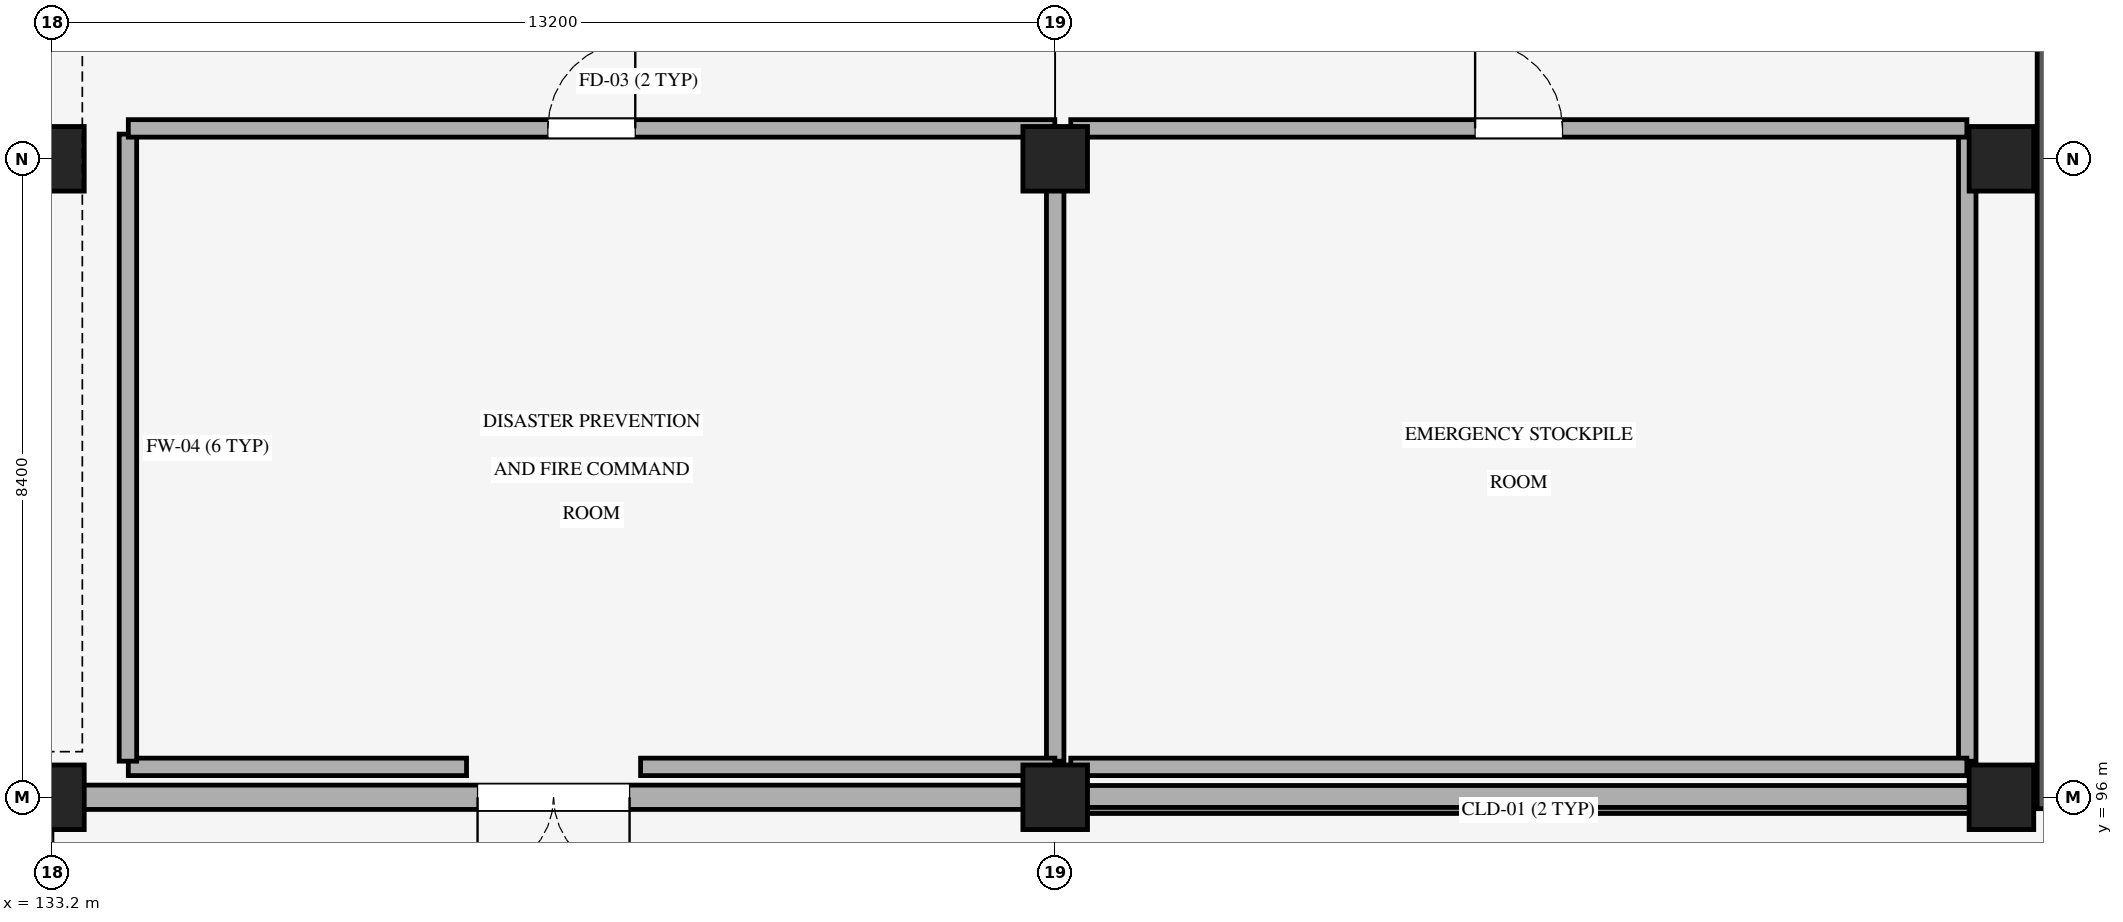
"""IFC4 building model, lengths in metres.
Left out: names, types, materials, properties, quantities, classifications, styles, units other than length and angle.
Written with IfcOpenShell. Run it as: python <this file> out.ifc"""

import sys

from ifc_helpers import new_model, si_unit, direction, frame, frame_2d, origin, origin_2d, place, context, subcontext, project, spatial, rectangle, extrude, element, fill, save


model = new_model("IFC4")
c1 = context("Model", 3, precision=1e-05, world=origin(), true_north=direction((0.0, 1.0)))
c2 = subcontext(c1, "Body", "Model", "MODEL_VIEW")
j1 = project(units=[si_unit("LENGTHUNIT", "METRE"), si_unit("PLANEANGLEUNIT", "RADIAN")], contexts=[c1])
p1 = place(None, origin())
s1 = spatial("IfcSite", under=j1, at=p1, CompositionType="ELEMENT")
p2 = place(p1, origin())
s2 = spatial("IfcBuilding", under=s1, at=p2, CompositionType="ELEMENT")
p3 = place(p2, origin())
s3 = spatial("IfcBuildingStorey", under=s2, at=p3, CompositionType="ELEMENT", Elevation=0.0)
for number, where, z_axis, x_axis in (
    (1, (133.2, 96.0, 0.0), (0.0, 0.0, 1.0), (1.0, 0.0, 0.0)),
    (2, (133.2, 104.4, 0.0), (0.0, 0.0, 1.0), (1.0, 0.0, 0.0)),
    (3, (146.4, 96.0, 0.0), (0.0, 0.0, 1.0), (1.0, 0.0, 0.0)),
    (4, (146.4, 104.4, 0.0), (0.0, 0.0, 1.0), (1.0, 0.0, 0.0)),
    (5, (158.85, 96.0, 0.0), (0.0, 0.0, 1.0), (1.0, 0.0, 0.0)),
    (6, (158.85, 104.4, 0.0), (0.0, 0.0, 1.0), (1.0, 0.0, 0.0)),
):
    element("IfcColumn", number, at=place(p3, frame(where, z_axis=z_axis, x_axis=x_axis)), inside=s3, PredefinedType="COLUMN", context=c2, shape_type="SweptSolid", body=[
        extrude(rectangle(XDim=0.85, YDim=0.85, at=origin_2d()), origin(), (0.0, 0.0, 1.0), 4.8),
    ])
p4 = place(p3, frame((158.85, 96.0, 0.0), z_axis=(0.0, 0.0, 1.0), x_axis=(-1.0, 0.0, 0.0)))
e7 = element("IfcWall", 7, at=p4, inside=s3, PredefinedType="STANDARD", context=c2, shape_type="SweptSolid", body=[
    extrude(rectangle(XDim=12.45, YDim=0.31, at=frame_2d((6.225, 0.0))), origin(), (0.0, 0.0, 1.0), 3.67),
])
p5 = place(p3, frame((146.4, 96.0, 0.0), z_axis=(0.0, 0.0, 1.0), x_axis=(-1.0, 0.0, 0.0)))
e8 = element("IfcWall", 8, at=p5, inside=s3, PredefinedType="STANDARD", context=c2, shape_type="SweptSolid", body=[
    extrude(rectangle(XDim=13.2, YDim=0.32, at=frame_2d((6.6, 0.0))), origin(), (0.0, 0.0, 1.0), 3.67),
])
p6 = place(p5, frame((5.6, 0.0, 0.0)))
e9 = element("IfcOpeningElement", 9, at=p6, cuts=e8, PredefinedType="OPENING", context=c2, shape_type="SweptSolid", body=[
    extrude(rectangle(XDim=2.0, YDim=2.4, at=frame_2d((1.0, 1.2))), frame((0.0, 0.17, 0.0), z_axis=(0.0, -1.0, 0.0), x_axis=(1.0, 0.0, 0.0)), (0.0, 0.0, 1.0), 0.34),
])
p7 = place(p3, frame((133.2, 96.0, 0.0), z_axis=(0.0, 0.0, 1.0), x_axis=(-1.0, 0.0, 0.0)))
e10 = element("IfcWall", 10, at=p7, inside=s3, PredefinedType="STANDARD", context=c2, shape_type="SweptSolid", body=[
    extrude(rectangle(XDim=9.6, YDim=0.32, at=frame_2d((4.8, 0.0))), origin(), (0.0, 0.0, 1.0), 3.67),
])
p8 = place(p7, frame((2.022, 0.0, 0.65)))
e11 = element("IfcOpeningElement", 11, at=p8, cuts=e10, PredefinedType="OPENING", context=c2, shape_type="SweptSolid", body=[
    extrude(rectangle(XDim=2.1, YDim=1.65, at=frame_2d((1.05, 0.825))), frame((0.0, 0.17, 0.0), z_axis=(0.0, -1.0, 0.0), x_axis=(1.0, 0.0, 0.0)), (0.0, 0.0, 1.0), 0.34),
])
p9 = place(p7, frame((5.478, 0.0, 0.65)))
e12 = element("IfcOpeningElement", 12, at=p9, cuts=e10, PredefinedType="OPENING", context=c2, shape_type="SweptSolid", body=[
    extrude(rectangle(XDim=2.1, YDim=1.65, at=frame_2d((1.05, 0.825))), frame((0.0, 0.17, 0.0), z_axis=(0.0, -1.0, 0.0), x_axis=(1.0, 0.0, 0.0)), (0.0, 0.0, 1.0), 0.34),
])
p10 = place(p3, frame((159.46, 95.85, 0.0), z_axis=(0.0, 0.0, 1.0), x_axis=(0.0, 1.0, 0.0)))
e13 = element("IfcWall", 13, at=p10, inside=s3, PredefinedType="SHEAR", context=c2, shape_type="SweptSolid", body=[
    extrude(rectangle(XDim=15.3, YDim=0.28, at=frame_2d((7.65, 0.0))), origin(), (0.0, 0.0, 1.0), 4.48),
])
p11 = place(p3, frame((146.4, 104.725, 0.0), z_axis=(0.0, 0.0, 1.0), x_axis=(0.0, -1.0, 0.0)))
e14 = element("IfcWall", 14, at=p11, inside=s3, PredefinedType="STANDARD", context=c2, shape_type="SweptSolid", body=[
    extrude(rectangle(XDim=8.25, YDim=0.23, at=frame_2d((4.125, 0.0))), origin(), (0.0, 0.0, 1.0), 3.27),
])
p12 = place(p3, frame((146.395, 96.4, 0.0), z_axis=(0.0, 0.0, 1.0), x_axis=(-1.0, 0.0, 0.0)))
e15 = element("IfcWall", 15, at=p12, inside=s3, PredefinedType="STANDARD", context=c2, shape_type="SweptSolid", body=[
    extrude(rectangle(XDim=5.45, YDim=0.23, at=frame_2d((2.725, 0.0))), origin(), (0.0, 0.0, 1.0), 3.67),
])
p13 = place(p3, frame((138.655, 96.4, 0.0), z_axis=(0.0, 0.0, 1.0), x_axis=(-1.0, 0.0, 0.0)))
e16 = element("IfcWall", 16, at=p13, inside=s3, PredefinedType="STANDARD", context=c2, shape_type="SweptSolid", body=[
    extrude(rectangle(XDim=4.45, YDim=0.23, at=frame_2d((2.225, 0.0))), origin(), (0.0, 0.0, 1.0), 4.49),
])
p14 = place(p3, frame((134.2, 96.475, 0.0), z_axis=(0.0, 0.0, 1.0), x_axis=(0.0, 1.0, 0.0)))
e17 = element("IfcWall", 17, at=p14, inside=s3, PredefinedType="STANDARD", context=c2, shape_type="SweptSolid", body=[
    extrude(rectangle(XDim=8.25, YDim=0.23, at=frame_2d((4.125, 0.0))), origin(), (0.0, 0.0, 1.0), 4.49),
])
p15 = place(p3, frame((134.205, 104.8, 0.0), z_axis=(0.0, 0.0, 1.0), x_axis=(1.0, 0.0, 0.0)))
e18 = element("IfcWall", 18, at=p15, inside=s3, PredefinedType="STANDARD", context=c2, shape_type="SweptSolid", body=[
    extrude(rectangle(XDim=12.19, YDim=0.23, at=frame_2d((6.095, 0.0))), origin(), (0.0, 0.0, 1.0), 3.27),
])
p16 = place(p15, frame((5.52, 0.0, 0.0)))
e19 = element("IfcOpeningElement", 19, at=p16, cuts=e18, PredefinedType="OPENING", context=c2, shape_type="SweptSolid", body=[
    extrude(rectangle(XDim=1.15, YDim=2.2, at=frame_2d((0.575, 1.1))), frame((0.0, 0.125, 0.0), z_axis=(0.0, -1.0, 0.0), x_axis=(1.0, 0.0, 0.0)), (0.0, 0.0, 1.0), 0.25),
])
p17 = place(p3, frame((158.4, 104.725, 0.0), z_axis=(0.0, 0.0, 1.0), x_axis=(0.0, -1.0, 0.0)))
e20 = element("IfcWall", 20, at=p17, inside=s3, PredefinedType="STANDARD", context=c2, shape_type="SweptSolid", body=[
    extrude(rectangle(XDim=8.25, YDim=0.23, at=frame_2d((4.125, 0.0))), origin(), (0.0, 0.0, 1.0), 3.27),
])
p18 = place(p3, frame((158.395, 96.4, 0.0), z_axis=(0.0, 0.0, 1.0), x_axis=(-1.0, 0.0, 0.0)))
e21 = element("IfcWall", 21, at=p18, inside=s3, PredefinedType="STANDARD", context=c2, shape_type="SweptSolid", body=[
    extrude(rectangle(XDim=11.79, YDim=0.23, at=frame_2d((5.895, 0.0))), origin(), (0.0, 0.0, 1.0), 3.67),
])
p19 = place(p3, frame((146.605, 104.8, 0.0), z_axis=(0.0, 0.0, 1.0), x_axis=(1.0, 0.0, 0.0)))
e22 = element("IfcWall", 22, at=p19, inside=s3, PredefinedType="STANDARD", context=c2, shape_type="SweptSolid", body=[
    extrude(rectangle(XDim=11.79, YDim=0.23, at=frame_2d((5.895, 0.0))), origin(), (0.0, 0.0, 1.0), 3.27),
])
p20 = place(p19, frame((5.32, 0.0, 0.0)))
e23 = element("IfcOpeningElement", 23, at=p20, cuts=e22, PredefinedType="OPENING", context=c2, shape_type="SweptSolid", body=[
    extrude(rectangle(XDim=1.15, YDim=2.2, at=frame_2d((0.575, 1.1))), frame((0.0, 0.125, 0.0), z_axis=(0.0, -1.0, 0.0), x_axis=(1.0, 0.0, 0.0)), (0.0, 0.0, 1.0), 0.25),
])
p21 = place(p6, origin())
e24 = element("IfcDoor", 24, at=p21, inside=s3, OperationType="DOUBLE_DOOR_SINGLE_SWING", PredefinedType="DOOR", context=c2, shape_type="SweptSolid", body=[
    extrude(rectangle(XDim=2.0, YDim=2.4, at=frame_2d((1.0, 1.2))), frame((0.0, 0.025, 0.0), z_axis=(0.0, -1.0, 0.0), x_axis=(1.0, 0.0, 0.0)), (0.0, 0.0, 1.0), 0.05),
])
fill(e9, e24)
p22 = place(p16, origin())
e25 = element("IfcDoor", 25, at=p22, inside=s3, OperationType="SINGLE_SWING_RIGHT", PredefinedType="DOOR", context=c2, shape_type="SweptSolid", body=[
    extrude(rectangle(XDim=1.15, YDim=2.2, at=frame_2d((0.575, 1.1))), frame((0.0, 0.025, 0.0), z_axis=(0.0, -1.0, 0.0), x_axis=(1.0, 0.0, 0.0)), (0.0, 0.0, 1.0), 0.05),
])
fill(e19, e25)
p23 = place(p20, origin())
e26 = element("IfcDoor", 26, at=p23, inside=s3, OperationType="SINGLE_SWING_LEFT", PredefinedType="DOOR", context=c2, shape_type="SweptSolid", body=[
    extrude(rectangle(XDim=1.15, YDim=2.2, at=frame_2d((0.575, 1.1))), frame((0.0, 0.025, 0.0), z_axis=(0.0, -1.0, 0.0), x_axis=(1.0, 0.0, 0.0)), (0.0, 0.0, 1.0), 0.05),
])
fill(e23, e26)
save(model, sys.argv[1])
